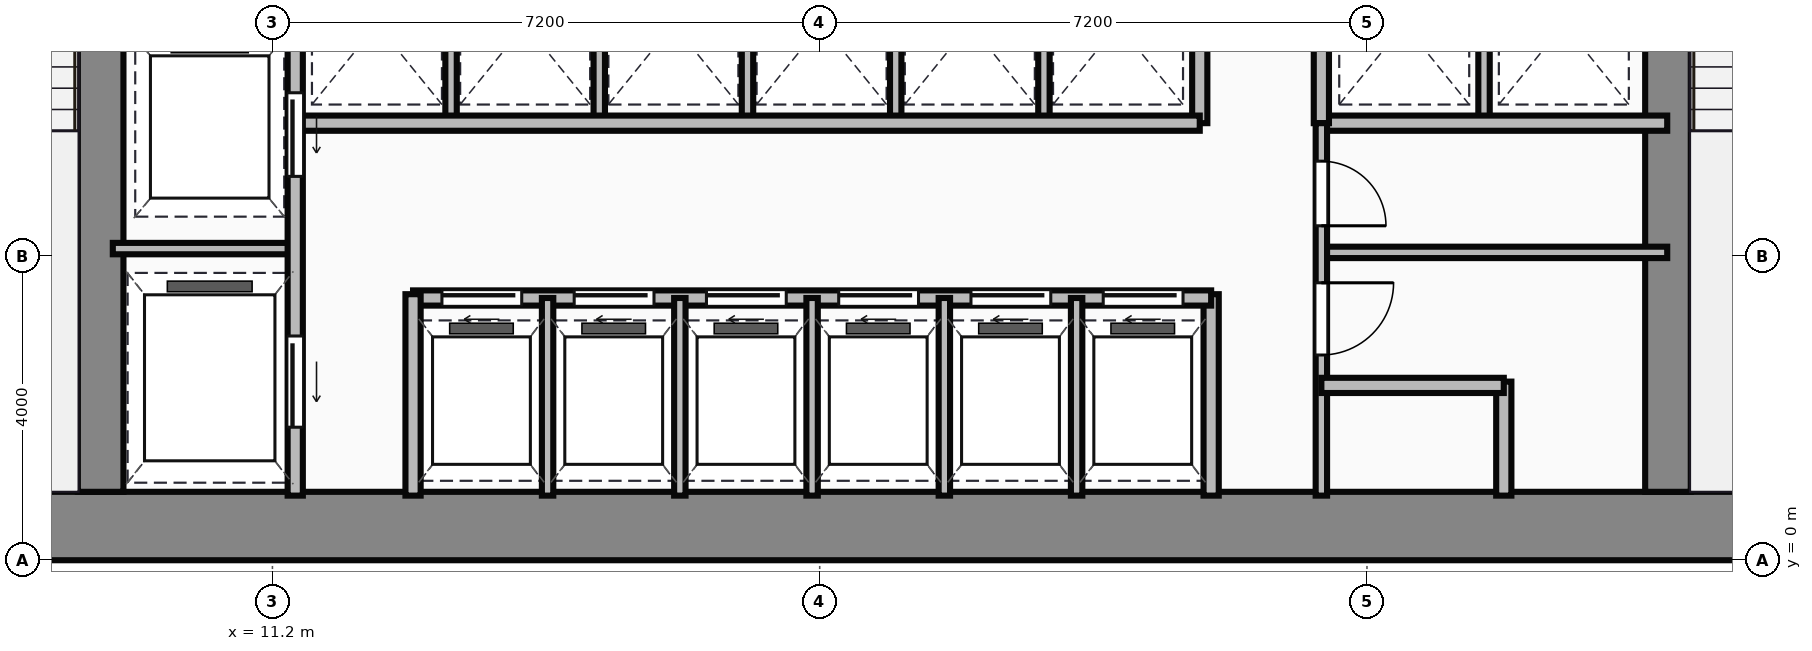
"""IFC4 building model, lengths in metres.
Left out: names, types, materials, properties, quantities, classifications, styles, units other than length and angle.
Written with IfcOpenShell. Run it as: python <this file> out.ifc"""

import sys

from ifc_helpers import new_model, si_unit, direction, frame, frame_2d, origin, place, context, subcontext, project, spatial, rectangle, extrude, source, transform, mapped, element, fill, save


model = new_model("IFC4")
c1 = context("Model", 3, precision=1e-05, world=origin(), true_north=direction((0.0, 1.0)))
c2 = subcontext(c1, "Body", "Model", "MODEL_VIEW")
j1 = project(units=[si_unit("LENGTHUNIT", "METRE"), si_unit("PLANEANGLEUNIT", "RADIAN")], contexts=[c1])
p1 = place(None, origin())
s1 = spatial("IfcSite", under=j1, at=p1, CompositionType="ELEMENT")
p2 = place(p1, origin())
s2 = spatial("IfcBuilding", under=s1, at=p2, CompositionType="ELEMENT")
p3 = place(p2, frame((0.0, 0.0, 69.0)))
s3 = spatial("IfcBuildingStorey", under=s2, at=p3, CompositionType="ELEMENT", Elevation=69.0)
m1 = source(origin(), c2, "Body", "SweptSolid", [
    extrude(rectangle(XDim=29.5, YDim=0.9, at=frame_2d((14.75, 0.0))), origin(), (0.0, 0.0, 1.0), 3.65),
])
p4 = place(p3, frame((4.5, 0.45, 0.0), z_axis=(0.0, 0.0, 1.0), x_axis=(1.0, 0.0, 0.0)))
e1 = element("IfcWall", 1, at=p4, inside=s3, PredefinedType="SHEAR", context=c2, shape_type="MappedRepresentation", body=[
    mapped(m1, transform((0.0, 0.0, 0.0))),
])
m2 = source(origin(), c2, "Body", "SweptSolid", [
    extrude(rectangle(XDim=12.2, YDim=0.6, at=frame_2d((6.1, 0.0))), origin(), (0.0, 0.0, 1.0), 3.65),
])
for number, where, z_axis, x_axis in (
    (2, (8.94, 0.9, 0.0), (0.0, 0.0, 1.0), (0.0, 1.0, 0.0)),
    (3, (29.56, 0.9, 0.0), (0.0, 0.0, 1.0), (0.0, 1.0, 0.0)),
):
    element("IfcWall", number, at=place(p3, frame(where, z_axis=z_axis, x_axis=x_axis)), inside=s3, PredefinedType="SHEAR", context=c2, shape_type="MappedRepresentation", body=[
        mapped(m2, transform((0.0, 0.0, 0.0))),
    ])
m3 = source(origin(), c2, "Body", "SweptSolid", [
    extrude(rectangle(XDim=9.6, YDim=0.2, at=frame_2d((4.8, 0.0))), origin(), (0.0, 0.0, 1.0), 3.4),
])
p5 = place(p3, frame((11.5, 0.85, 0.0), z_axis=(0.0, 0.0, 1.0), x_axis=(0.0, 1.0, 0.0)))
e4 = element("IfcWall", 4, at=p5, inside=s3, PredefinedType="PARTITIONING", context=c2, shape_type="MappedRepresentation", body=[
    mapped(m3, transform((0.0, 0.0, 0.0))),
])
p6 = place(p5, frame((4.2, 0.0, 0.0)))
e5 = element("IfcOpeningElement", 5, at=p6, cuts=e4, PredefinedType="OPENING", context=c2, shape_type="SweptSolid", body=[
    extrude(rectangle(XDim=1.1, YDim=2.15, at=frame_2d((0.55, 1.075))), frame((0.0, 0.11, 0.0), z_axis=(0.0, -1.0, 0.0), x_axis=(1.0, 0.0, 0.0)), (0.0, 0.0, 1.0), 0.22),
])
p7 = place(p5, frame((0.9, 0.0, 0.0)))
e6 = element("IfcOpeningElement", 6, at=p7, cuts=e4, PredefinedType="OPENING", context=c2, shape_type="SweptSolid", body=[
    extrude(rectangle(XDim=1.2, YDim=2.15, at=frame_2d((0.6, 1.075))), frame((0.0, 0.11, 0.0), z_axis=(0.0, -1.0, 0.0), x_axis=(1.0, 0.0, 0.0)), (0.0, 0.0, 1.0), 0.22),
])
m4 = source(origin(), c2, "Body", "SweptSolid", [
    extrude(rectangle(XDim=2.4, YDim=0.15, at=frame_2d((1.2, 0.0))), origin(), (0.0, 0.0, 1.0), 3.4),
])
p8 = place(p3, frame((9.1, 4.1, 0.0), z_axis=(0.0, 0.0, 1.0), x_axis=(1.0, 0.0, 0.0)))
e7 = element("IfcWall", 7, at=p8, inside=s3, PredefinedType="PARTITIONING", context=c2, shape_type="MappedRepresentation", body=[
    mapped(m4, transform((0.0, 0.0, 0.0))),
])
m5 = source(origin(), c2, "Body", "SweptSolid", [
    extrude(rectangle(XDim=2.65, YDim=0.2, at=frame_2d((1.325, 0.0))), origin(), (0.0, 0.0, 1.0), 3.4),
])
p9 = place(p3, frame((13.05, 0.85, 0.0), z_axis=(0.0, 0.0, 1.0), x_axis=(0.0, 1.0, 0.0)))
e8 = element("IfcWall", 8, at=p9, inside=s3, PredefinedType="PARTITIONING", context=c2, shape_type="MappedRepresentation", body=[
    mapped(m5, transform((0.0, 0.0, 0.0))),
])
m6 = source(origin(), c2, "Body", "SweptSolid", [
    extrude(rectangle(XDim=10.5, YDim=0.2, at=frame_2d((5.25, 0.0))), origin(), (0.0, 0.0, 1.0), 3.4),
])
p10 = place(p3, frame((13.05, 3.45, 0.0), z_axis=(0.0, 0.0, 1.0), x_axis=(1.0, 0.0, 0.0)))
e9 = element("IfcWall", 9, at=p10, inside=s3, PredefinedType="PARTITIONING", context=c2, shape_type="MappedRepresentation", body=[
    mapped(m6, transform((0.0, 0.0, 0.0))),
])
p11 = place(p10, frame((0.38, 0.0, 0.0)))
e10 = element("IfcOpeningElement", 10, at=p11, cuts=e9, PredefinedType="OPENING", context=c2, shape_type="SweptSolid", body=[
    extrude(rectangle(XDim=1.05, YDim=2.15, at=frame_2d((0.525, 1.075))), frame((0.0, 0.11, 0.0), z_axis=(0.0, -1.0, 0.0), x_axis=(1.0, 0.0, 0.0)), (0.0, 0.0, 1.0), 0.22),
])
p12 = place(p10, frame((2.12, 0.0, 0.0)))
e11 = element("IfcOpeningElement", 11, at=p12, cuts=e9, PredefinedType="OPENING", context=c2, shape_type="SweptSolid", body=[
    extrude(rectangle(XDim=1.05, YDim=2.15, at=frame_2d((0.525, 1.075))), frame((0.0, 0.11, 0.0), z_axis=(0.0, -1.0, 0.0), x_axis=(1.0, 0.0, 0.0)), (0.0, 0.0, 1.0), 0.22),
])
p13 = place(p10, frame((3.86, 0.0, 0.0)))
e12 = element("IfcOpeningElement", 12, at=p13, cuts=e9, PredefinedType="OPENING", context=c2, shape_type="SweptSolid", body=[
    extrude(rectangle(XDim=1.05, YDim=2.15, at=frame_2d((0.525, 1.075))), frame((0.0, 0.11, 0.0), z_axis=(0.0, -1.0, 0.0), x_axis=(1.0, 0.0, 0.0)), (0.0, 0.0, 1.0), 0.22),
])
p14 = place(p10, frame((5.6, 0.0, 0.0)))
e13 = element("IfcOpeningElement", 13, at=p14, cuts=e9, PredefinedType="OPENING", context=c2, shape_type="SweptSolid", body=[
    extrude(rectangle(XDim=1.05, YDim=2.15, at=frame_2d((0.525, 1.075))), frame((0.0, 0.11, 0.0), z_axis=(0.0, -1.0, 0.0), x_axis=(1.0, 0.0, 0.0)), (0.0, 0.0, 1.0), 0.22),
])
p15 = place(p10, frame((7.34, 0.0, 0.0)))
e14 = element("IfcOpeningElement", 14, at=p15, cuts=e9, PredefinedType="OPENING", context=c2, shape_type="SweptSolid", body=[
    extrude(rectangle(XDim=1.05, YDim=2.15, at=frame_2d((0.525, 1.075))), frame((0.0, 0.11, 0.0), z_axis=(0.0, -1.0, 0.0), x_axis=(1.0, 0.0, 0.0)), (0.0, 0.0, 1.0), 0.22),
])
p16 = place(p10, frame((9.08, 0.0, 0.0)))
e15 = element("IfcOpeningElement", 15, at=p16, cuts=e9, PredefinedType="OPENING", context=c2, shape_type="SweptSolid", body=[
    extrude(rectangle(XDim=1.05, YDim=2.15, at=frame_2d((0.525, 1.075))), frame((0.0, 0.11, 0.0), z_axis=(0.0, -1.0, 0.0), x_axis=(1.0, 0.0, 0.0)), (0.0, 0.0, 1.0), 0.22),
])
p17 = place(p3, frame((23.55, 0.85, 0.0), z_axis=(0.0, 0.0, 1.0), x_axis=(0.0, 1.0, 0.0)))
e16 = element("IfcWall", 16, at=p17, inside=s3, PredefinedType="PARTITIONING", context=c2, shape_type="MappedRepresentation", body=[
    mapped(m5, transform((0.0, 0.0, 0.0))),
])
m7 = source(origin(), c2, "Body", "SweptSolid", [
    extrude(rectangle(XDim=2.6, YDim=0.15, at=frame_2d((1.3, 0.0))), origin(), (0.0, 0.0, 1.0), 3.4),
])
for number, where, z_axis, x_axis in (
    (17, (14.82, 0.85, 0.0), (0.0, 0.0, 1.0), (0.0, 1.0, 0.0)),
    (18, (16.56, 0.85, 0.0), (0.0, 0.0, 1.0), (0.0, 1.0, 0.0)),
    (19, (18.3, 0.85, 0.0), (0.0, 0.0, 1.0), (0.0, 1.0, 0.0)),
    (20, (20.04, 0.85, 0.0), (0.0, 0.0, 1.0), (0.0, 1.0, 0.0)),
    (21, (21.78, 0.85, 0.0), (0.0, 0.0, 1.0), (0.0, 1.0, 0.0)),
):
    element("IfcWall", number, at=place(p3, frame(where, z_axis=z_axis, x_axis=x_axis)), inside=s3, PredefinedType="PARTITIONING", context=c2, shape_type="MappedRepresentation", body=[
        mapped(m7, transform((0.0, 0.0, 0.0))),
    ])
m8 = source(origin(), c2, "Body", "SweptSolid", [
    extrude(rectangle(XDim=11.85, YDim=0.2, at=frame_2d((5.925, 0.0))), origin(), (0.0, 0.0, 1.0), 3.4),
])
p18 = place(p3, frame((11.55, 5.75, 0.0), z_axis=(0.0, 0.0, 1.0), x_axis=(1.0, 0.0, 0.0)))
e22 = element("IfcWall", 22, at=p18, inside=s3, PredefinedType="PARTITIONING", context=c2, shape_type="MappedRepresentation", body=[
    mapped(m8, transform((0.0, 0.0, 0.0))),
])
m9 = source(origin(), c2, "Body", "SweptSolid", [
    extrude(rectangle(XDim=2.6, YDim=0.2, at=frame_2d((1.3, 0.0))), origin(), (0.0, 0.0, 1.0), 3.4),
])
p19 = place(p3, frame((23.4, 5.75, 0.0), z_axis=(0.0, 0.0, 1.0), x_axis=(0.0, 1.0, 0.0)))
e23 = element("IfcWall", 23, at=p19, inside=s3, PredefinedType="PARTITIONING", context=c2, shape_type="MappedRepresentation", body=[
    mapped(m9, transform((0.0, 0.0, 0.0))),
])
m10 = source(origin(), c2, "Body", "SweptSolid", [
    extrude(rectangle(XDim=2.5, YDim=0.15, at=frame_2d((1.25, 0.0))), origin(), (0.0, 0.0, 1.0), 3.4),
])
for number, where, z_axis, x_axis in (
    (24, (13.55, 5.8, 0.0), (0.0, 0.0, 1.0), (0.0, 1.0, 0.0)),
    (25, (15.5, 5.8, 0.0), (0.0, 0.0, 1.0), (0.0, 1.0, 0.0)),
    (26, (17.45, 5.8, 0.0), (0.0, 0.0, 1.0), (0.0, 1.0, 0.0)),
    (27, (19.4, 5.8, 0.0), (0.0, 0.0, 1.0), (0.0, 1.0, 0.0)),
    (28, (21.35, 5.8, 0.0), (0.0, 0.0, 1.0), (0.0, 1.0, 0.0)),
):
    element("IfcWall", number, at=place(p3, frame(where, z_axis=z_axis, x_axis=x_axis)), inside=s3, PredefinedType="PARTITIONING", context=c2, shape_type="MappedRepresentation", body=[
        mapped(m10, transform((0.0, 0.0, 0.0))),
    ])
m11 = source(origin(), c2, "Body", "SweptSolid", [
    extrude(rectangle(XDim=4.55, YDim=0.2, at=frame_2d((2.275, 0.0))), origin(), (0.0, 0.0, 1.0), 3.4),
])
p20 = place(p3, frame((25.0, 5.75, 0.0), z_axis=(0.0, 0.0, 1.0), x_axis=(1.0, 0.0, 0.0)))
e29 = element("IfcWall", 29, at=p20, inside=s3, PredefinedType="PARTITIONING", context=c2, shape_type="MappedRepresentation", body=[
    mapped(m11, transform((0.0, 0.0, 0.0))),
])
p21 = place(p3, frame((25.0, 5.75, 0.0), z_axis=(0.0, 0.0, 1.0), x_axis=(0.0, 1.0, 0.0)))
e30 = element("IfcWall", 30, at=p21, inside=s3, PredefinedType="PARTITIONING", context=c2, shape_type="MappedRepresentation", body=[
    mapped(m9, transform((0.0, 0.0, 0.0))),
])
p22 = place(p3, frame((27.14, 5.8, 0.0), z_axis=(0.0, 0.0, 1.0), x_axis=(0.0, 1.0, 0.0)))
e31 = element("IfcWall", 31, at=p22, inside=s3, PredefinedType="PARTITIONING", context=c2, shape_type="MappedRepresentation", body=[
    mapped(m10, transform((0.0, 0.0, 0.0))),
])
m12 = source(origin(), c2, "Body", "SweptSolid", [
    extrude(rectangle(XDim=4.9, YDim=0.15, at=frame_2d((2.45, 0.0))), origin(), (0.0, 0.0, 1.0), 3.4),
])
p23 = place(p3, frame((25.0, 0.85, 0.0), z_axis=(0.0, 0.0, 1.0), x_axis=(0.0, 1.0, 0.0)))
e32 = element("IfcWall", 32, at=p23, inside=s3, PredefinedType="PARTITIONING", context=c2, shape_type="MappedRepresentation", body=[
    mapped(m12, transform((0.0, 0.0, 0.0))),
])
p24 = place(p23, frame((1.85, 0.0, 0.0)))
e33 = element("IfcOpeningElement", 33, at=p24, cuts=e32, PredefinedType="OPENING", context=c2, shape_type="SweptSolid", body=[
    extrude(rectangle(XDim=0.95, YDim=2.15, at=frame_2d((0.475, 1.075))), frame((0.0, 0.085, 0.0), z_axis=(0.0, -1.0, 0.0), x_axis=(1.0, 0.0, 0.0)), (0.0, 0.0, 1.0), 0.17),
])
p25 = place(p23, frame((3.55, 0.0, 0.0)))
e34 = element("IfcOpeningElement", 34, at=p25, cuts=e32, PredefinedType="OPENING", context=c2, shape_type="SweptSolid", body=[
    extrude(rectangle(XDim=0.85, YDim=2.15, at=frame_2d((0.425, 1.075))), frame((0.0, 0.085, 0.0), z_axis=(0.0, -1.0, 0.0), x_axis=(1.0, 0.0, 0.0)), (0.0, 0.0, 1.0), 0.17),
])
m13 = source(origin(), c2, "Body", "SweptSolid", [
    extrude(rectangle(XDim=2.4, YDim=0.2, at=frame_2d((1.2, 0.0))), origin(), (0.0, 0.0, 1.0), 3.4),
])
p26 = place(p3, frame((25.0, 2.3, 0.0), z_axis=(0.0, 0.0, 1.0), x_axis=(1.0, 0.0, 0.0)))
e35 = element("IfcWall", 35, at=p26, inside=s3, PredefinedType="PARTITIONING", context=c2, shape_type="MappedRepresentation", body=[
    mapped(m13, transform((0.0, 0.0, 0.0))),
])
m14 = source(origin(), c2, "Body", "SweptSolid", [
    extrude(rectangle(XDim=1.5, YDim=0.2, at=frame_2d((0.75, 0.0))), origin(), (0.0, 0.0, 1.0), 3.4),
])
p27 = place(p3, frame((27.4, 0.85, 0.0), z_axis=(0.0, 0.0, 1.0), x_axis=(0.0, 1.0, 0.0)))
e36 = element("IfcWall", 36, at=p27, inside=s3, PredefinedType="PARTITIONING", context=c2, shape_type="MappedRepresentation", body=[
    mapped(m14, transform((0.0, 0.0, 0.0))),
])
m15 = source(origin(), c2, "Body", "SweptSolid", [
    extrude(rectangle(XDim=4.55, YDim=0.15, at=frame_2d((2.275, 0.0))), origin(), (0.0, 0.0, 1.0), 3.4),
])
p28 = place(p3, frame((25.0, 4.05, 0.0), z_axis=(0.0, 0.0, 1.0), x_axis=(1.0, 0.0, 0.0)))
e37 = element("IfcWall", 37, at=p28, inside=s3, PredefinedType="PARTITIONING", context=c2, shape_type="MappedRepresentation", body=[
    mapped(m15, transform((0.0, 0.0, 0.0))),
])
m16 = source(origin(), c2, "Body", "SweptSolid", [
    extrude(rectangle(XDim=1.1, YDim=2.15, at=frame_2d((0.55, 1.075))), frame((0.0, 0.025, 0.0), z_axis=(0.0, -1.0, 0.0), x_axis=(1.0, 0.0, 0.0)), (0.0, 0.0, 1.0), 0.05),
])
p29 = place(p6, frame((1.1, 0.0, 0.0), z_axis=(0.0, 0.0, 1.0), x_axis=(-1.0, 0.0, 0.0)))
e38 = element("IfcDoor", 38, at=p29, inside=s3, OperationType="SLIDING_TO_LEFT", PredefinedType="DOOR", context=c2, shape_type="MappedRepresentation", body=[
    mapped(m16, transform((0.0, 0.0, 0.0))),
])
fill(e5, e38)
m17 = source(origin(), c2, "Body", "SweptSolid", [
    extrude(rectangle(XDim=1.2, YDim=2.15, at=frame_2d((0.6, 1.075))), frame((0.0, 0.025, 0.0), z_axis=(0.0, -1.0, 0.0), x_axis=(1.0, 0.0, 0.0)), (0.0, 0.0, 1.0), 0.05),
])
p30 = place(p7, frame((1.2, 0.0, 0.0), z_axis=(0.0, 0.0, 1.0), x_axis=(-1.0, 0.0, 0.0)))
e39 = element("IfcDoor", 39, at=p30, inside=s3, OperationType="SLIDING_TO_LEFT", PredefinedType="DOOR", context=c2, shape_type="MappedRepresentation", body=[
    mapped(m17, transform((0.0, 0.0, 0.0))),
])
fill(e6, e39)
m18 = source(origin(), c2, "Body", "SweptSolid", [
    extrude(rectangle(XDim=1.05, YDim=2.15, at=frame_2d((0.525, 1.075))), frame((0.0, 0.025, 0.0), z_axis=(0.0, -1.0, 0.0), x_axis=(1.0, 0.0, 0.0)), (0.0, 0.0, 1.0), 0.05),
])
p31 = place(p11, origin())
e40 = element("IfcDoor", 40, at=p31, inside=s3, OperationType="SLIDING_TO_LEFT", PredefinedType="DOOR", context=c2, shape_type="MappedRepresentation", body=[
    mapped(m18, transform((0.0, 0.0, 0.0))),
])
fill(e10, e40)
p32 = place(p12, origin())
e41 = element("IfcDoor", 41, at=p32, inside=s3, OperationType="SLIDING_TO_LEFT", PredefinedType="DOOR", context=c2, shape_type="MappedRepresentation", body=[
    mapped(m18, transform((0.0, 0.0, 0.0))),
])
fill(e11, e41)
p33 = place(p13, origin())
e42 = element("IfcDoor", 42, at=p33, inside=s3, OperationType="SLIDING_TO_LEFT", PredefinedType="DOOR", context=c2, shape_type="MappedRepresentation", body=[
    mapped(m18, transform((0.0, 0.0, 0.0))),
])
fill(e12, e42)
p34 = place(p14, origin())
e43 = element("IfcDoor", 43, at=p34, inside=s3, OperationType="SLIDING_TO_LEFT", PredefinedType="DOOR", context=c2, shape_type="MappedRepresentation", body=[
    mapped(m18, transform((0.0, 0.0, 0.0))),
])
fill(e13, e43)
p35 = place(p15, origin())
e44 = element("IfcDoor", 44, at=p35, inside=s3, OperationType="SLIDING_TO_LEFT", PredefinedType="DOOR", context=c2, shape_type="MappedRepresentation", body=[
    mapped(m18, transform((0.0, 0.0, 0.0))),
])
fill(e14, e44)
p36 = place(p16, origin())
e45 = element("IfcDoor", 45, at=p36, inside=s3, OperationType="SLIDING_TO_LEFT", PredefinedType="DOOR", context=c2, shape_type="MappedRepresentation", body=[
    mapped(m18, transform((0.0, 0.0, 0.0))),
])
fill(e15, e45)
m19 = source(origin(), c2, "Body", "SweptSolid", [
    extrude(rectangle(XDim=0.95, YDim=2.15, at=frame_2d((0.475, 1.075))), frame((0.0, 0.025, 0.0), z_axis=(0.0, -1.0, 0.0), x_axis=(1.0, 0.0, 0.0)), (0.0, 0.0, 1.0), 0.05),
])
p37 = place(p24, origin())
e46 = element("IfcDoor", 46, at=p37, inside=s3, OperationType="SINGLE_SWING_RIGHT", PredefinedType="DOOR", context=c2, shape_type="MappedRepresentation", body=[
    mapped(m19, transform((0.0, 0.0, 0.0))),
])
fill(e33, e46)
m20 = source(origin(), c2, "Body", "SweptSolid", [
    extrude(rectangle(XDim=0.85, YDim=2.15, at=frame_2d((0.425, 1.075))), frame((0.0, 0.025, 0.0), z_axis=(0.0, -1.0, 0.0), x_axis=(1.0, 0.0, 0.0)), (0.0, 0.0, 1.0), 0.05),
])
p38 = place(p25, origin())
e47 = element("IfcDoor", 47, at=p38, inside=s3, OperationType="SINGLE_SWING_LEFT", PredefinedType="DOOR", context=c2, shape_type="MappedRepresentation", body=[
    mapped(m20, transform((0.0, 0.0, 0.0))),
])
fill(e34, e47)
save(model, sys.argv[1])
